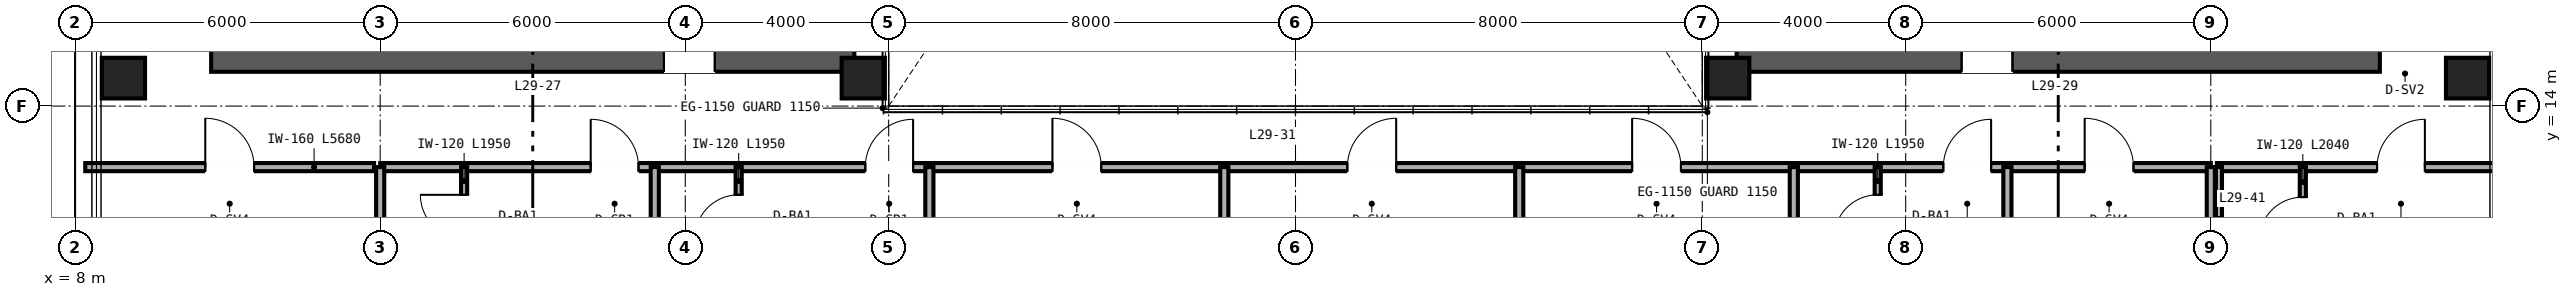
"""IFC4 building model, lengths in metres.
Left out: names, types, materials, properties, quantities, classifications, styles, units other than length and angle.
Written with IfcOpenShell. Run it as: python <this file> out.ifc"""

import sys

from ifc_helpers import new_model, si_unit, direction, frame, frame_2d, origin, origin_2d, place, context, subcontext, project, spatial, rectangle, hollow_rectangle, extrude, source, transform, mapped, element, fill, save


model = new_model("IFC4")
c1 = context("Model", 3, precision=1e-05, world=origin(), true_north=direction((0.0, 1.0)))
c2 = subcontext(c1, "Body", "Model", "MODEL_VIEW")
j1 = project(units=[si_unit("LENGTHUNIT", "METRE"), si_unit("PLANEANGLEUNIT", "RADIAN")], contexts=[c1])
p1 = place(None, origin())
s1 = spatial("IfcSite", under=j1, at=p1, CompositionType="ELEMENT")
p2 = place(p1, origin())
s2 = spatial("IfcBuilding", under=s1, at=p2, CompositionType="ELEMENT")
p3 = place(p2, frame((0.0, 0.0, 118.8)))
s3 = spatial("IfcBuildingStorey", under=s2, at=p3, CompositionType="ELEMENT", Elevation=118.8)
p4 = place(p3, frame((10.675, 15.0, 0.0), z_axis=(0.0, 0.0, 1.0), x_axis=(1.0, 0.0, 0.0)))
e1 = element("IfcWall", 1, at=p4, inside=s3, PredefinedType="SHEAR", context=c2, shape_type="SweptSolid", body=[
    extrude(rectangle(XDim=12.65, YDim=0.65, at=frame_2d((6.325, 0.0))), origin(), (0.0, 0.0, 1.0), 3.36),
])
p5 = place(p4, frame((8.905, 0.0, 0.0)))
e2 = element("IfcOpeningElement", 2, at=p5, cuts=e1, PredefinedType="OPENING", context=c2, shape_type="SweptSolid", body=[
    extrude(rectangle(XDim=1.0, YDim=2.15, at=frame_2d((0.5, 1.075))), frame((0.0, 0.335, 0.0), z_axis=(0.0, -1.0, 0.0), x_axis=(1.0, 0.0, 0.0)), (0.0, 0.0, 1.0), 0.67),
])
p6 = place(p3, frame((40.675, 15.0, 0.0), z_axis=(0.0, 0.0, 1.0), x_axis=(1.0, 0.0, 0.0)))
e3 = element("IfcWall", 3, at=p6, inside=s3, PredefinedType="SHEAR", context=c2, shape_type="SweptSolid", body=[
    extrude(rectangle(XDim=12.65, YDim=0.65, at=frame_2d((6.325, 0.0))), origin(), (0.0, 0.0, 1.0), 3.36),
])
p7 = place(p6, frame((4.425, 0.0, 0.0)))
e4 = element("IfcOpeningElement", 4, at=p7, cuts=e3, PredefinedType="OPENING", context=c2, shape_type="SweptSolid", body=[
    extrude(rectangle(XDim=1.0, YDim=2.15, at=frame_2d((0.5, 1.075))), frame((0.0, 0.335, 0.0), z_axis=(0.0, -1.0, 0.0), x_axis=(1.0, 0.0, 0.0)), (0.0, 0.0, 1.0), 0.67),
])
m1 = source(origin(), c2, "Body", "SweptSolid", [
    extrude(hollow_rectangle(XDim=0.85, YDim=0.8, WallThickness=0.032, at=origin_2d()), origin(), (0.0, 0.0, 1.0), 3.36),
])
for number, where, z_axis, x_axis in (
    (5, (8.95, 14.55, 0.0), (0.0, 0.0, 1.0), (1.0, 0.0, 0.0)),
    (6, (23.5, 14.55, 0.0), (0.0, 0.0, 1.0), (1.0, 0.0, 0.0)),
    (7, (40.5, 14.55, 0.0), (0.0, 0.0, 1.0), (1.0, 0.0, 0.0)),
    (8, (55.05, 14.55, 0.0), (0.0, 0.0, 1.0), (1.0, 0.0, 0.0)),
):
    element("IfcColumn", number, at=place(p3, frame(where, z_axis=z_axis, x_axis=x_axis)), inside=s3, PredefinedType="COLUMN", context=c2, shape_type="MappedRepresentation", body=[
        mapped(m1, transform((0.0, 0.0, 0.0), scale=1.0)),
    ])
p8 = place(p3, frame((8.2, 12.8, 0.0), z_axis=(0.0, 0.0, 1.0), x_axis=(1.0, 0.0, 0.0)))
e9 = element("IfcWall", 9, at=p8, inside=s3, PredefinedType="PARTITIONING", context=c2, shape_type="SweptSolid", body=[
    extrude(rectangle(XDim=5.68, YDim=0.16, at=frame_2d((2.84, 0.0))), origin(), (0.0, 0.0, 1.0), 3.36),
])
p9 = place(p8, frame((2.36, 0.0, 0.0)))
e10 = element("IfcOpeningElement", 10, at=p9, cuts=e9, PredefinedType="OPENING", context=c2, shape_type="SweptSolid", body=[
    extrude(rectangle(XDim=0.96, YDim=2.15, at=frame_2d((0.48, 1.075))), frame((0.0, 0.09, 0.0), z_axis=(0.0, -1.0, 0.0), x_axis=(1.0, 0.0, 0.0)), (0.0, 0.0, 1.0), 0.18),
])
p10 = place(p3, frame((50.12, 12.8, 0.0), z_axis=(0.0, 0.0, 1.0), x_axis=(1.0, 0.0, 0.0)))
e11 = element("IfcWall", 11, at=p10, inside=s3, PredefinedType="PARTITIONING", context=c2, shape_type="SweptSolid", body=[
    extrude(rectangle(XDim=5.68, YDim=0.16, at=frame_2d((2.84, 0.0))), origin(), (0.0, 0.0, 1.0), 3.36),
])
p11 = place(p10, frame((3.15, 0.0, 0.0)))
e12 = element("IfcOpeningElement", 12, at=p11, cuts=e11, PredefinedType="OPENING", context=c2, shape_type="SweptSolid", body=[
    extrude(rectangle(XDim=0.94, YDim=2.15, at=frame_2d((0.47, 1.075))), frame((0.0, 0.09, 0.0), z_axis=(0.0, -1.0, 0.0), x_axis=(1.0, 0.0, 0.0)), (0.0, 0.0, 1.0), 0.18),
])
p12 = place(p3, frame((51.81, 10.76, 0.0), z_axis=(0.0, 0.0, 1.0), x_axis=(0.0, 1.0, 0.0)))
e13 = element("IfcWall", 13, at=p12, inside=s3, PredefinedType="PARTITIONING", context=c2, shape_type="SweptSolid", body=[
    extrude(rectangle(XDim=2.04, YDim=0.12, at=frame_2d((1.02, 0.0))), origin(), (0.0, 0.0, 1.0), 3.36),
])
p13 = place(p12, frame((0.59, 0.0, 0.0)))
e14 = element("IfcOpeningElement", 14, at=p13, cuts=e13, PredefinedType="OPENING", context=c2, shape_type="SweptSolid", body=[
    extrude(rectangle(XDim=0.86, YDim=2.1, at=frame_2d((0.43, 1.05))), frame((0.0, 0.07, 0.0), z_axis=(0.0, -1.0, 0.0), x_axis=(1.0, 0.0, 0.0)), (0.0, 0.0, 1.0), 0.14),
])
p14 = place(p3, frame((50.16, 10.76, 0.0), z_axis=(0.0, 0.0, 1.0), x_axis=(0.0, 1.0, 0.0)))
e15 = element("IfcWall", 15, at=p14, inside=s3, PredefinedType="PARTITIONING", context=c2, shape_type="SweptSolid", body=[
    extrude(rectangle(XDim=2.04, YDim=0.12, at=frame_2d((1.02, 0.0))), origin(), (0.0, 0.0, 1.0), 3.36),
])
p15 = place(p3, frame((14.0, 12.8, 0.0), z_axis=(0.0, 0.0, 1.0), x_axis=(1.0, 0.0, 0.0)))
e16 = element("IfcWall", 16, at=p15, inside=s3, PredefinedType="PARTITIONING", context=c2, shape_type="SweptSolid", body=[
    extrude(rectangle(XDim=36.0, YDim=0.16, at=frame_2d((18.0, 0.0))), origin(), (0.0, 0.0, 1.0), 2.581),
])
p16 = place(p15, frame((4.14, 0.0, 0.0)))
e17 = element("IfcOpeningElement", 17, at=p16, cuts=e16, PredefinedType="OPENING", context=c2, shape_type="SweptSolid", body=[
    extrude(rectangle(XDim=0.94, YDim=2.15, at=frame_2d((0.47, 1.075))), frame((0.0, 0.09, 0.0), z_axis=(0.0, -1.0, 0.0), x_axis=(1.0, 0.0, 0.0)), (0.0, 0.0, 1.0), 0.18),
])
p17 = place(p15, frame((9.54, 0.0, 0.0)))
e18 = element("IfcOpeningElement", 18, at=p17, cuts=e16, PredefinedType="OPENING", context=c2, shape_type="SweptSolid", body=[
    extrude(rectangle(XDim=0.94, YDim=2.15, at=frame_2d((0.47, 1.075))), frame((0.0, 0.09, 0.0), z_axis=(0.0, -1.0, 0.0), x_axis=(1.0, 0.0, 0.0)), (0.0, 0.0, 1.0), 0.18),
])
p18 = place(p15, frame((13.22, 0.0, 0.0)))
e19 = element("IfcOpeningElement", 19, at=p18, cuts=e16, PredefinedType="OPENING", context=c2, shape_type="SweptSolid", body=[
    extrude(rectangle(XDim=0.96, YDim=2.15, at=frame_2d((0.48, 1.075))), frame((0.0, 0.09, 0.0), z_axis=(0.0, -1.0, 0.0), x_axis=(1.0, 0.0, 0.0)), (0.0, 0.0, 1.0), 0.18),
])
p19 = place(p15, frame((19.02, 0.0, 0.0)))
e20 = element("IfcOpeningElement", 20, at=p19, cuts=e16, PredefinedType="OPENING", context=c2, shape_type="SweptSolid", body=[
    extrude(rectangle(XDim=0.96, YDim=2.15, at=frame_2d((0.48, 1.075))), frame((0.0, 0.09, 0.0), z_axis=(0.0, -1.0, 0.0), x_axis=(1.0, 0.0, 0.0)), (0.0, 0.0, 1.0), 0.18),
])
p20 = place(p15, frame((24.62, 0.0, 0.0)))
e21 = element("IfcOpeningElement", 21, at=p20, cuts=e16, PredefinedType="OPENING", context=c2, shape_type="SweptSolid", body=[
    extrude(rectangle(XDim=0.96, YDim=2.15, at=frame_2d((0.48, 1.075))), frame((0.0, 0.09, 0.0), z_axis=(0.0, -1.0, 0.0), x_axis=(1.0, 0.0, 0.0)), (0.0, 0.0, 1.0), 0.18),
])
p21 = place(p15, frame((30.74, 0.0, 0.0)))
e22 = element("IfcOpeningElement", 22, at=p21, cuts=e16, PredefinedType="OPENING", context=c2, shape_type="SweptSolid", body=[
    extrude(rectangle(XDim=0.94, YDim=2.15, at=frame_2d((0.47, 1.075))), frame((0.0, 0.09, 0.0), z_axis=(0.0, -1.0, 0.0), x_axis=(1.0, 0.0, 0.0)), (0.0, 0.0, 1.0), 0.18),
])
p22 = place(p15, frame((33.52, 0.0, 0.0)))
e23 = element("IfcOpeningElement", 23, at=p22, cuts=e16, PredefinedType="OPENING", context=c2, shape_type="SweptSolid", body=[
    extrude(rectangle(XDim=0.96, YDim=2.15, at=frame_2d((0.48, 1.075))), frame((0.0, 0.09, 0.0), z_axis=(0.0, -1.0, 0.0), x_axis=(1.0, 0.0, 0.0)), (0.0, 0.0, 1.0), 0.18),
])
for number, where, z_axis, x_axis in (
    (24, (14.0, 2.36, 0.0), (0.0, 0.0, 1.0), (0.0, 1.0, 0.0)),
    (25, (50.0, 2.36, 0.0), (0.0, 0.0, 1.0), (0.0, 1.0, 0.0)),
    (26, (19.4, 2.36, 0.0), (0.0, 0.0, 1.0), (0.0, 1.0, 0.0)),
):
    element("IfcWall", number, at=place(p3, frame(where, z_axis=z_axis, x_axis=x_axis)), inside=s3, PredefinedType="PARTITIONING", context=c2, shape_type="SweptSolid", body=[
        extrude(rectangle(XDim=10.44, YDim=0.16, at=frame_2d((5.22, 0.0))), origin(), (0.0, 0.0, 1.0), 2.667),
    ])
p23 = place(p3, frame((15.65, 10.85, 0.0), z_axis=(0.0, 0.0, 1.0), x_axis=(0.0, 1.0, 0.0)))
e27 = element("IfcWall", 27, at=p23, inside=s3, PredefinedType="PARTITIONING", context=c2, shape_type="SweptSolid", body=[
    extrude(rectangle(XDim=1.95, YDim=0.12, at=frame_2d((0.975, 0.0))), origin(), (0.0, 0.0, 1.0), 3.36),
])
p24 = place(p23, frame((0.545, 0.0, 0.0)))
e28 = element("IfcOpeningElement", 28, at=p24, cuts=e27, PredefinedType="OPENING", context=c2, shape_type="SweptSolid", body=[
    extrude(rectangle(XDim=0.86, YDim=2.1, at=frame_2d((0.43, 1.05))), frame((0.0, 0.07, 0.0), z_axis=(0.0, -1.0, 0.0), x_axis=(1.0, 0.0, 0.0)), (0.0, 0.0, 1.0), 0.14),
])
p25 = place(p3, frame((24.8, 2.36, 0.0), z_axis=(0.0, 0.0, 1.0), x_axis=(0.0, 1.0, 0.0)))
e29 = element("IfcWall", 29, at=p25, inside=s3, PredefinedType="PARTITIONING", context=c2, shape_type="SweptSolid", body=[
    extrude(rectangle(XDim=10.44, YDim=0.16, at=frame_2d((5.22, 0.0))), origin(), (0.0, 0.0, 1.0), 2.433),
])
p26 = place(p3, frame((21.05, 10.85, 0.0), z_axis=(0.0, 0.0, 1.0), x_axis=(0.0, 1.0, 0.0)))
e30 = element("IfcWall", 30, at=p26, inside=s3, PredefinedType="PARTITIONING", context=c2, shape_type="SweptSolid", body=[
    extrude(rectangle(XDim=1.95, YDim=0.12, at=frame_2d((0.975, 0.0))), origin(), (0.0, 0.0, 1.0), 3.36),
])
p27 = place(p26, frame((0.545, 0.0, 0.0)))
e31 = element("IfcOpeningElement", 31, at=p27, cuts=e30, PredefinedType="OPENING", context=c2, shape_type="SweptSolid", body=[
    extrude(rectangle(XDim=0.86, YDim=2.1, at=frame_2d((0.43, 1.05))), frame((0.0, 0.07, 0.0), z_axis=(0.0, -1.0, 0.0), x_axis=(1.0, 0.0, 0.0)), (0.0, 0.0, 1.0), 0.14),
])
for number, where, z_axis, x_axis in (
    (32, (30.6, 2.36, 0.0), (0.0, 0.0, 1.0), (0.0, 1.0, 0.0)),
    (33, (36.4, 2.36, 0.0), (0.0, 0.0, 1.0), (0.0, 1.0, 0.0)),
):
    element("IfcWall", number, at=place(p3, frame(where, z_axis=z_axis, x_axis=x_axis)), inside=s3, PredefinedType="PARTITIONING", context=c2, shape_type="SweptSolid", body=[
        extrude(rectangle(XDim=10.44, YDim=0.16, at=frame_2d((5.22, 0.0))), origin(), (0.0, 0.0, 1.0), 2.433),
    ])
p28 = place(p3, frame((41.8, 2.36, 0.0), z_axis=(0.0, 0.0, 1.0), x_axis=(0.0, 1.0, 0.0)))
e34 = element("IfcWall", 34, at=p28, inside=s3, PredefinedType="PARTITIONING", context=c2, shape_type="SweptSolid", body=[
    extrude(rectangle(XDim=10.44, YDim=0.16, at=frame_2d((5.22, 0.0))), origin(), (0.0, 0.0, 1.0), 2.823),
])
p29 = place(p3, frame((46.0, 2.36, 0.0), z_axis=(0.0, 0.0, 1.0), x_axis=(0.0, 1.0, 0.0)))
e35 = element("IfcWall", 35, at=p29, inside=s3, PredefinedType="PARTITIONING", context=c2, shape_type="SweptSolid", body=[
    extrude(rectangle(XDim=10.44, YDim=0.16, at=frame_2d((5.22, 0.0))), origin(), (0.0, 0.0, 1.0), 2.667),
])
p30 = place(p3, frame((43.45, 10.85, 0.0), z_axis=(0.0, 0.0, 1.0), x_axis=(0.0, 1.0, 0.0)))
e36 = element("IfcWall", 36, at=p30, inside=s3, PredefinedType="PARTITIONING", context=c2, shape_type="SweptSolid", body=[
    extrude(rectangle(XDim=1.95, YDim=0.12, at=frame_2d((0.975, 0.0))), origin(), (0.0, 0.0, 1.0), 3.36),
])
p31 = place(p30, frame((0.545, 0.0, 0.0)))
e37 = element("IfcOpeningElement", 37, at=p31, cuts=e36, PredefinedType="OPENING", context=c2, shape_type="SweptSolid", body=[
    extrude(rectangle(XDim=0.86, YDim=2.1, at=frame_2d((0.43, 1.05))), frame((0.0, 0.07, 0.0), z_axis=(0.0, -1.0, 0.0), x_axis=(1.0, 0.0, 0.0)), (0.0, 0.0, 1.0), 0.14),
])
m2 = source(origin(), c2, "Body", "SweptSolid", [
    extrude(rectangle(XDim=1.0, YDim=2.15, at=frame_2d((0.5, 1.075))), frame((0.0, 0.025, 0.0), z_axis=(0.0, -1.0, 0.0), x_axis=(1.0, 0.0, 0.0)), (0.0, 0.0, 1.0), 0.05),
])
p32 = place(p5, origin())
e38 = element("IfcDoor", 38, at=p32, inside=s3, OperationType="SINGLE_SWING_LEFT", PredefinedType="DOOR", context=c2, shape_type="MappedRepresentation", body=[
    mapped(m2, transform((0.0, 0.0, 0.0), scale=1.0)),
])
fill(e2, e38)
p33 = place(p7, origin())
e39 = element("IfcDoor", 39, at=p33, inside=s3, OperationType="SINGLE_SWING_RIGHT", PredefinedType="DOOR", context=c2, shape_type="MappedRepresentation", body=[
    mapped(m2, transform((0.0, 0.0, 0.0), scale=1.0)),
])
fill(e4, e39)
m3 = source(origin(), c2, "Body", "SweptSolid", [
    extrude(rectangle(XDim=0.96, YDim=2.15, at=frame_2d((0.48, 1.075))), frame((0.0, 0.025, 0.0), z_axis=(0.0, -1.0, 0.0), x_axis=(1.0, 0.0, 0.0)), (0.0, 0.0, 1.0), 0.05),
])
p34 = place(p9, origin())
e40 = element("IfcDoor", 40, at=p34, inside=s3, OperationType="SINGLE_SWING_LEFT", PredefinedType="DOOR", context=c2, shape_type="MappedRepresentation", body=[
    mapped(m3, transform((0.0, 0.0, 0.0), scale=1.0)),
])
fill(e10, e40)
m4 = source(origin(), c2, "Body", "SweptSolid", [
    extrude(rectangle(XDim=0.86, YDim=2.1, at=frame_2d((0.43, 1.05))), frame((0.0, 0.025, 0.0), z_axis=(0.0, -1.0, 0.0), x_axis=(1.0, 0.0, 0.0)), (0.0, 0.0, 1.0), 0.05),
])
p35 = place(p13, origin())
e41 = element("IfcDoor", 41, at=p35, inside=s3, OperationType="SINGLE_SWING_LEFT", PredefinedType="DOOR", context=c2, shape_type="MappedRepresentation", body=[
    mapped(m4, transform((0.0, 0.0, 0.0), scale=1.0)),
])
fill(e14, e41)
m5 = source(origin(), c2, "Body", "SweptSolid", [
    extrude(rectangle(XDim=0.94, YDim=2.15, at=frame_2d((0.47, 1.075))), frame((0.0, 0.025, 0.0), z_axis=(0.0, -1.0, 0.0), x_axis=(1.0, 0.0, 0.0)), (0.0, 0.0, 1.0), 0.05),
])
p36 = place(p11, origin())
e42 = element("IfcDoor", 42, at=p36, inside=s3, OperationType="SINGLE_SWING_RIGHT", PredefinedType="DOOR", context=c2, shape_type="MappedRepresentation", body=[
    mapped(m5, transform((0.0, 0.0, 0.0), scale=1.0)),
])
fill(e12, e42)
p37 = place(p24, origin())
e43 = element("IfcDoor", 43, at=p37, inside=s3, OperationType="SINGLE_SWING_RIGHT", PredefinedType="DOOR", context=c2, shape_type="MappedRepresentation", body=[
    mapped(m4, transform((0.0, 0.0, 0.0), scale=1.0)),
])
fill(e28, e43)
p38 = place(p27, origin())
e44 = element("IfcDoor", 44, at=p38, inside=s3, OperationType="SINGLE_SWING_LEFT", PredefinedType="DOOR", context=c2, shape_type="MappedRepresentation", body=[
    mapped(m4, transform((0.0, 0.0, 0.0), scale=1.0)),
])
fill(e31, e44)
p39 = place(p31, origin())
e45 = element("IfcDoor", 45, at=p39, inside=s3, OperationType="SINGLE_SWING_LEFT", PredefinedType="DOOR", context=c2, shape_type="MappedRepresentation", body=[
    mapped(m4, transform((0.0, 0.0, 0.0), scale=1.0)),
])
fill(e37, e45)
p40 = place(p16, origin())
e46 = element("IfcDoor", 46, at=p40, inside=s3, OperationType="SINGLE_SWING_LEFT", PredefinedType="DOOR", context=c2, shape_type="MappedRepresentation", body=[
    mapped(m5, transform((0.0, 0.0, 0.0), scale=1.0)),
])
fill(e17, e46)
p41 = place(p17, origin())
e47 = element("IfcDoor", 47, at=p41, inside=s3, OperationType="SINGLE_SWING_RIGHT", PredefinedType="DOOR", context=c2, shape_type="MappedRepresentation", body=[
    mapped(m5, transform((0.0, 0.0, 0.0), scale=1.0)),
])
fill(e18, e47)
p42 = place(p18, origin())
e48 = element("IfcDoor", 48, at=p42, inside=s3, OperationType="SINGLE_SWING_LEFT", PredefinedType="DOOR", context=c2, shape_type="MappedRepresentation", body=[
    mapped(m3, transform((0.0, 0.0, 0.0), scale=1.0)),
])
fill(e19, e48)
p43 = place(p19, origin())
e49 = element("IfcDoor", 49, at=p43, inside=s3, OperationType="SINGLE_SWING_RIGHT", PredefinedType="DOOR", context=c2, shape_type="MappedRepresentation", body=[
    mapped(m3, transform((0.0, 0.0, 0.0), scale=1.0)),
])
fill(e20, e49)
p44 = place(p20, origin())
e50 = element("IfcDoor", 50, at=p44, inside=s3, OperationType="SINGLE_SWING_LEFT", PredefinedType="DOOR", context=c2, shape_type="MappedRepresentation", body=[
    mapped(m3, transform((0.0, 0.0, 0.0), scale=1.0)),
])
fill(e21, e50)
p45 = place(p21, origin())
e51 = element("IfcDoor", 51, at=p45, inside=s3, OperationType="SINGLE_SWING_RIGHT", PredefinedType="DOOR", context=c2, shape_type="MappedRepresentation", body=[
    mapped(m5, transform((0.0, 0.0, 0.0), scale=1.0)),
])
fill(e22, e51)
p46 = place(p22, origin())
e52 = element("IfcDoor", 52, at=p46, inside=s3, OperationType="SINGLE_SWING_LEFT", PredefinedType="DOOR", context=c2, shape_type="MappedRepresentation", body=[
    mapped(m3, transform((0.0, 0.0, 0.0), scale=1.0)),
])
fill(e23, e52)
save(model, sys.argv[1])
